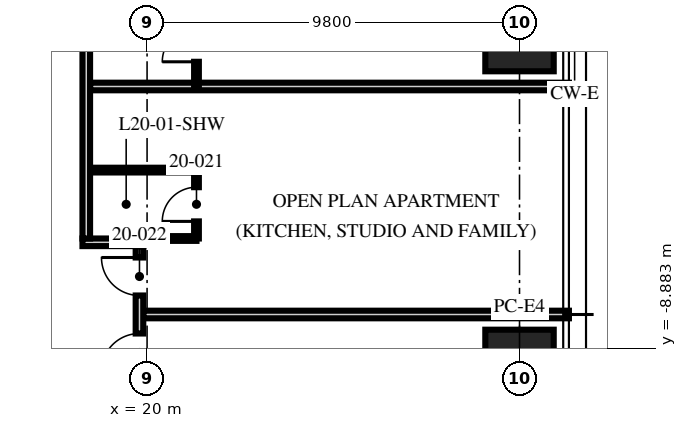
"""IFC4 building model, lengths in metres.
Left out: names, types, materials, properties, quantities, classifications, styles, units other than length and angle.
Written with IfcOpenShell. Run it as: python <this file> out.ifc"""

import sys

from ifc_helpers import new_model, si_unit, direction, frame, frame_2d, origin, origin_2d, place, context, subcontext, project, spatial, rectangle, hollow_rectangle, extrude, element, fill, save


model = new_model("IFC4")
c1 = context("Model", 3, precision=1e-05, world=origin(), true_north=direction((0.0, 1.0)))
c2 = subcontext(c1, "Body", "Model", "MODEL_VIEW")
j1 = project(units=[si_unit("LENGTHUNIT", "METRE"), si_unit("PLANEANGLEUNIT", "RADIAN")], contexts=[c1])
p1 = place(None, origin())
s1 = spatial("IfcSite", under=j1, at=p1, CompositionType="ELEMENT")
p2 = place(p1, origin())
s2 = spatial("IfcBuilding", under=s1, at=p2, CompositionType="ELEMENT")
p3 = place(p2, frame((0.0, 0.0, 81.0)))
s3 = spatial("IfcBuildingStorey", under=s2, at=p3, CompositionType="ELEMENT", Elevation=81.0)
for number, where, z_axis, x_axis in (
    (1, (29.8, 0.0, 0.0), (0.0, 0.0, 1.0), (0.0, 1.0, 0.0)),
    (2, (29.8, -10.0, 0.0), (0.0, 0.0, 1.0), (0.0, 1.0, 0.0)),
):
    element("IfcColumn", number, at=place(p3, frame(where, z_axis=z_axis, x_axis=x_axis)), inside=s3, PredefinedType="COLUMN", context=c2, shape_type="SweptSolid", body=[
        extrude(hollow_rectangle(XDim=3.2, YDim=1.8, WallThickness=0.2, at=origin_2d()), origin(), (0.0, 0.0, 1.0), 3.75),
    ])
p4 = place(p3, frame((19.9, -8.0, 0.0), z_axis=(0.0, 0.0, 1.0), x_axis=(1.0, 0.0, 0.0)))
e3 = element("IfcWall", 3, at=p4, inside=s3, PredefinedType="PARTITIONING", context=c2, shape_type="SweptSolid", body=[
    extrude(rectangle(XDim=11.2, YDim=0.2, at=frame_2d((5.6, 0.0))), origin(), (0.0, 0.0, 1.0), 2.71),
])
p5 = place(p3, frame((18.5, -2.0, 0.0), z_axis=(0.0, 0.0, 1.0), x_axis=(1.0, 0.0, 0.0)))
e4 = element("IfcWall", 4, at=p5, inside=s3, PredefinedType="PARTITIONING", context=c2, shape_type="SweptSolid", body=[
    extrude(rectangle(XDim=12.6, YDim=0.2, at=frame_2d((6.3, 0.0))), origin(), (0.0, 0.0, 1.0), 2.71),
])
p6 = place(p3, frame((21.3, -6.0, 0.0), z_axis=(0.0, 0.0, 1.0), x_axis=(0.0, 1.0, 0.0)))
e5 = element("IfcWall", 5, at=p6, inside=s3, PredefinedType="PARTITIONING", context=c2, shape_type="SweptSolid", body=[
    extrude(rectangle(XDim=1.8, YDim=0.125, at=frame_2d((0.9, 0.0))), origin(), (0.0, 0.0, 1.0), 2.61),
])
p7 = place(p6, frame((0.45, 0.0, 0.0)))
e6 = element("IfcOpeningElement", 6, at=p7, cuts=e5, PredefinedType="OPENING", context=c2, shape_type="SweptSolid", body=[
    extrude(rectangle(XDim=0.9, YDim=2.1, at=frame_2d((0.45, 1.05))), frame((0.0, 0.073, 0.0), z_axis=(0.0, -1.0, 0.0), x_axis=(1.0, 0.0, 0.0)), (0.0, 0.0, 1.0), 0.145),
])
p8 = place(p3, frame((19.97, -6.0, 0.0), z_axis=(0.0, 0.0, 1.0), x_axis=(1.0, 0.0, 0.0)))
e7 = element("IfcWall", 7, at=p8, inside=s3, PredefinedType="PARTITIONING", context=c2, shape_type="SweptSolid", body=[
    extrude(rectangle(XDim=1.33, YDim=0.125, at=frame_2d((0.665, 0.0))), origin(), (0.0, 0.0, 1.0), 3.5),
])
p9 = place(p3, frame((18.5, -4.2, 0.0), z_axis=(0.0, 0.0, 1.0), x_axis=(1.0, 0.0, 0.0)))
e8 = element("IfcWall", 8, at=p9, inside=s3, PredefinedType="PARTITIONING", context=c2, shape_type="SweptSolid", body=[
    extrude(rectangle(XDim=2.8, YDim=0.125, at=frame_2d((1.4, 0.0))), origin(), (0.0, 0.0, 1.0), 3.5),
])
p10 = place(p3, frame((21.3, -2.0, 0.0), z_axis=(0.0, 0.0, 1.0), x_axis=(0.0, 1.0, 0.0)))
e9 = element("IfcWall", 9, at=p10, inside=s3, PredefinedType="PARTITIONING", context=c2, shape_type="SweptSolid", body=[
    extrude(rectangle(XDim=2.2, YDim=0.125, at=frame_2d((1.1, 0.0))), origin(), (0.0, 0.0, 1.0), 2.492),
])
p11 = place(p10, frame((0.65, 0.0, 0.0)))
e10 = element("IfcOpeningElement", 10, at=p11, cuts=e9, PredefinedType="OPENING", context=c2, shape_type="SweptSolid", body=[
    extrude(rectangle(XDim=0.9, YDim=2.1, at=frame_2d((0.45, 1.05))), frame((0.0, 0.073, 0.0), z_axis=(0.0, -1.0, 0.0), x_axis=(1.0, 0.0, 0.0)), (0.0, 0.0, 1.0), 0.145),
])
p12 = place(p3, frame((18.3, -6.1, 0.0), z_axis=(0.0, 0.0, 1.0), x_axis=(1.0, 0.0, 0.0)))
e11 = element("IfcWall", 11, at=p12, inside=s3, PredefinedType="PARTITIONING", context=c2, shape_type="SweptSolid", body=[
    extrude(rectangle(XDim=1.6, YDim=0.2, at=frame_2d((0.8, 0.0))), origin(), (0.0, 0.0, 1.0), 3.5),
])
p13 = place(p3, frame((19.8, -9.8, 0.0), z_axis=(0.0, 0.0, 1.0), x_axis=(0.0, 1.0, 0.0)))
e12 = element("IfcWall", 12, at=p13, inside=s3, PredefinedType="PARTITIONING", context=c2, shape_type="SweptSolid", body=[
    extrude(rectangle(XDim=3.6, YDim=0.2, at=frame_2d((1.8, 0.0))), origin(), (0.0, 0.0, 1.0), 3.5),
])
p14 = place(p13, frame((2.3, 0.0, 0.0)))
e13 = element("IfcOpeningElement", 13, at=p14, cuts=e12, PredefinedType="OPENING", context=c2, shape_type="SweptSolid", body=[
    extrude(rectangle(XDim=1.0, YDim=2.2, at=frame_2d((0.5, 1.1))), frame((0.0, 0.11, 0.0), z_axis=(0.0, -1.0, 0.0), x_axis=(1.0, 0.0, 0.0)), (0.0, 0.0, 1.0), 0.22),
])
p15 = place(p13, frame((0.3, 0.0, 0.0)))
e14 = element("IfcOpeningElement", 14, at=p15, cuts=e12, PredefinedType="OPENING", context=c2, shape_type="SweptSolid", body=[
    extrude(rectangle(XDim=1.0, YDim=2.2, at=frame_2d((0.5, 1.1))), frame((0.0, 0.11, 0.0), z_axis=(0.0, -1.0, 0.0), x_axis=(1.0, 0.0, 0.0)), (0.0, 0.0, 1.0), 0.22),
])
p16 = place(p3, frame((18.4, -6.0, 0.0), z_axis=(0.0, 0.0, 1.0), x_axis=(0.0, 1.0, 0.0)))
e15 = element("IfcWall", 15, at=p16, inside=s3, PredefinedType="PARTITIONING", context=c2, shape_type="SweptSolid", body=[
    extrude(rectangle(XDim=12.0, YDim=0.2, at=frame_2d((6.0, 0.0))), origin(), (0.0, 0.0, 1.0), 2.492),
])
p17 = place(p7, origin())
e16 = element("IfcDoor", 16, at=p17, inside=s3, OperationType="SINGLE_SWING_LEFT", PredefinedType="DOOR", context=c2, shape_type="SweptSolid", body=[
    extrude(rectangle(XDim=0.9, YDim=2.1, at=frame_2d((0.45, 1.05))), frame((0.0, 0.025, 0.0), z_axis=(0.0, -1.0, 0.0), x_axis=(1.0, 0.0, 0.0)), (0.0, 0.0, 1.0), 0.05),
])
fill(e6, e16)
p18 = place(p14, origin())
e17 = element("IfcDoor", 17, at=p18, inside=s3, OperationType="SINGLE_SWING_RIGHT", PredefinedType="DOOR", context=c2, shape_type="SweptSolid", body=[
    extrude(rectangle(XDim=1.0, YDim=2.2, at=frame_2d((0.5, 1.1))), frame((0.0, 0.025, 0.0), z_axis=(0.0, -1.0, 0.0), x_axis=(1.0, 0.0, 0.0)), (0.0, 0.0, 1.0), 0.05),
])
fill(e13, e17)
p19 = place(p11, origin())
e18 = element("IfcDoor", 18, at=p19, inside=s3, OperationType="SINGLE_SWING_LEFT", PredefinedType="DOOR", context=c2, shape_type="SweptSolid", body=[
    extrude(rectangle(XDim=0.9, YDim=2.1, at=frame_2d((0.45, 1.05))), frame((0.0, 0.025, 0.0), z_axis=(0.0, -1.0, 0.0), x_axis=(1.0, 0.0, 0.0)), (0.0, 0.0, 1.0), 0.05),
])
fill(e10, e18)
p20 = place(p15, origin())
e19 = element("IfcDoor", 19, at=p20, inside=s3, OperationType="SINGLE_SWING_LEFT", PredefinedType="DOOR", context=c2, shape_type="SweptSolid", body=[
    extrude(rectangle(XDim=1.0, YDim=2.2, at=frame_2d((0.5, 1.1))), frame((0.0, 0.025, 0.0), z_axis=(0.0, -1.0, 0.0), x_axis=(1.0, 0.0, 0.0)), (0.0, 0.0, 1.0), 0.05),
])
fill(e14, e19)
save(model, sys.argv[1])
